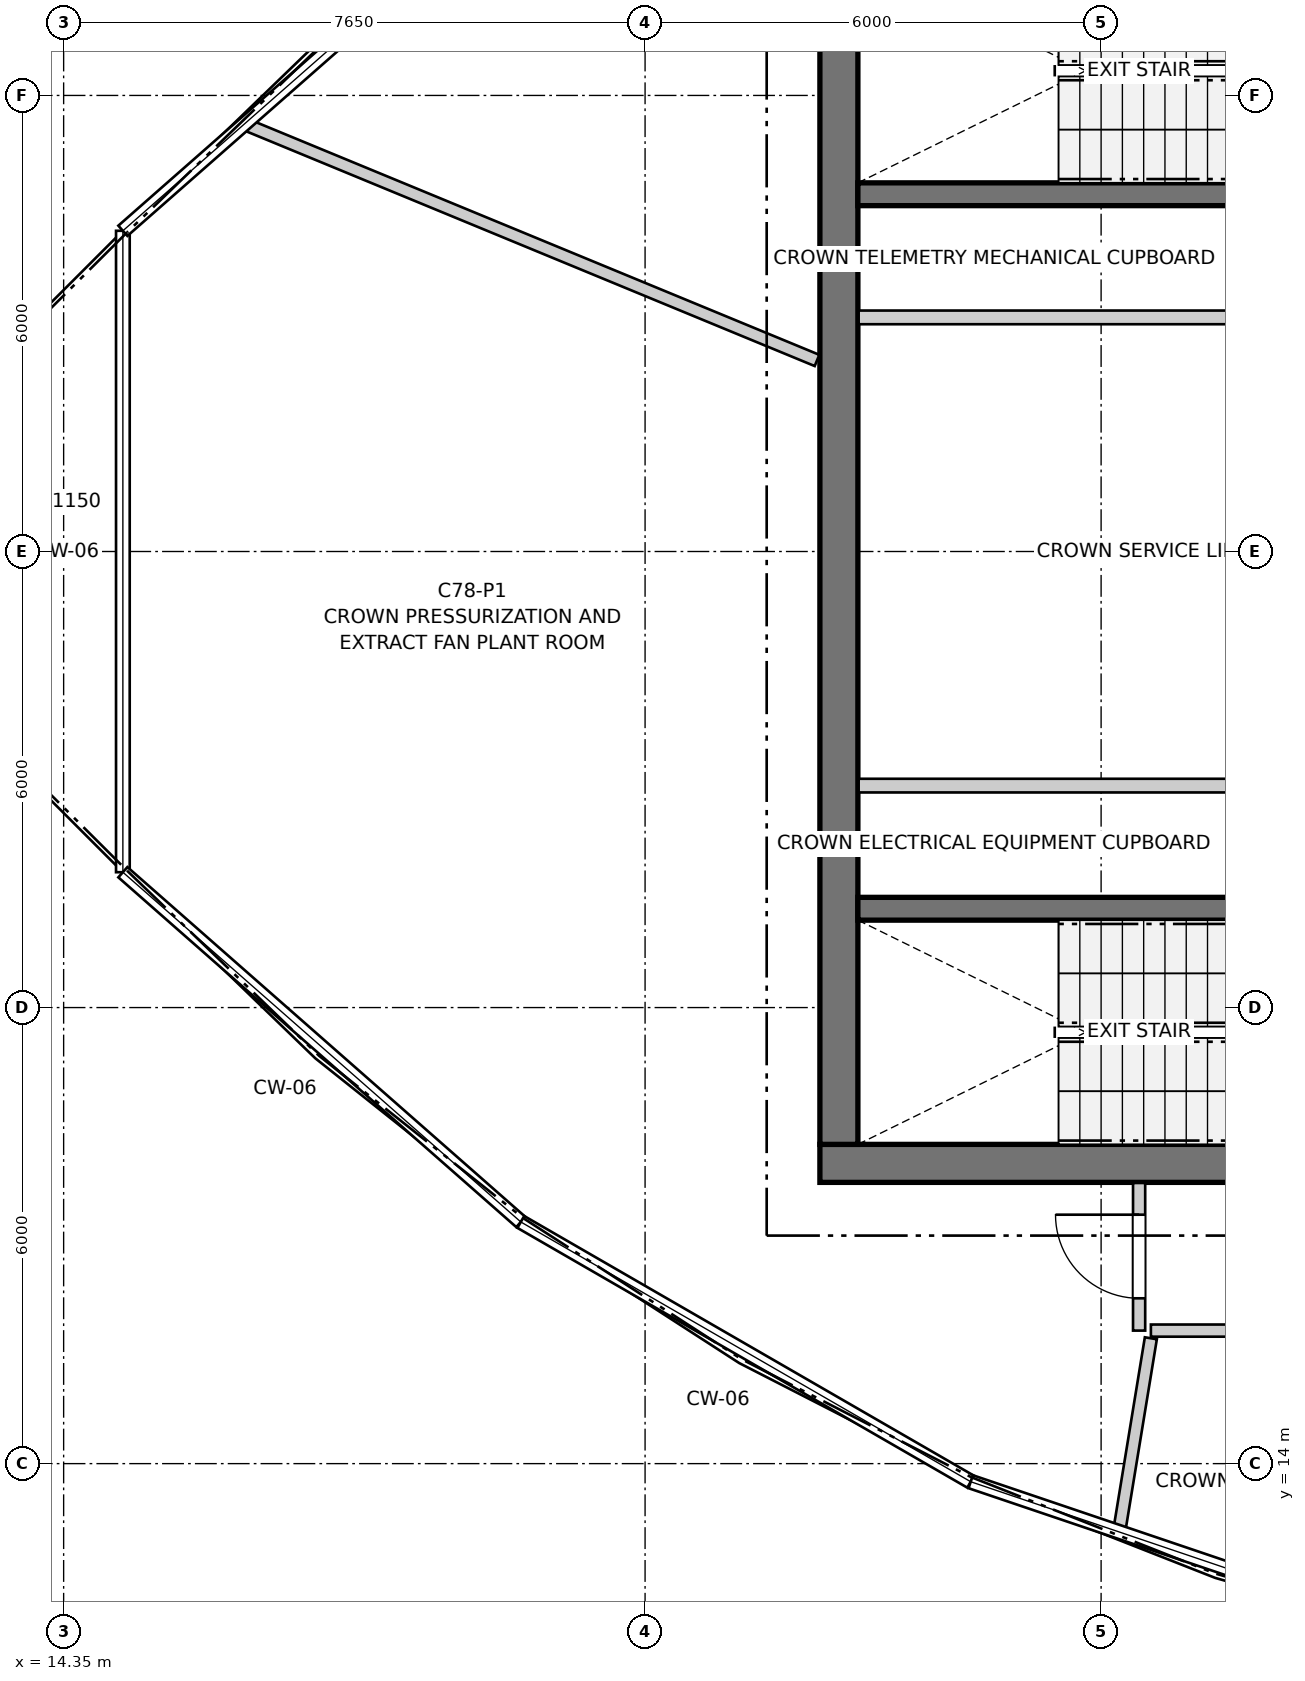
"""IFC4 building model, lengths in metres.
Left out: names, types, materials, properties, quantities, classifications, styles, units other than length and angle.
Written with IfcOpenShell. Run it as: python <this file> out.ifc"""

import sys

from ifc_helpers import new_model, si_unit, direction, frame, frame_2d, origin, place, context, subcontext, project, spatial, rectangle, extrude, source, transform, mapped, element, fill, save


model = new_model("IFC4")
c1 = context("Model", 3, precision=1e-05, world=origin(), true_north=direction((0.0, 1.0)))
c2 = subcontext(c1, "Body", "Model", "MODEL_VIEW")
j1 = project(units=[si_unit("LENGTHUNIT", "METRE"), si_unit("PLANEANGLEUNIT", "RADIAN")], contexts=[c1])
p1 = place(None, origin())
s1 = spatial("IfcSite", under=j1, at=p1, CompositionType="ELEMENT")
p2 = place(p1, origin())
s2 = spatial("IfcBuilding", under=s1, at=p2, CompositionType="ELEMENT")
p3 = place(p2, frame((0.0, 0.0, 261.8)))
s3 = spatial("IfcBuildingStorey", under=s2, at=p3, CompositionType="ELEMENT", Elevation=261.8)
p4 = place(p3, frame((24.3, 17.95, 0.0), z_axis=(0.0, 0.0, 1.0), x_axis=(1.0, 0.0, 0.0)))
e1 = element("IfcWall", 1, at=p4, inside=s3, PredefinedType="SHEAR", context=c2, shape_type="SweptSolid", body=[
    extrude(rectangle(XDim=12.1, YDim=0.5, at=frame_2d((6.05, 0.0))), origin(), (0.0, 0.0, 1.0), 4.05),
])
p5 = place(p3, frame((24.55, 33.8, 0.0), z_axis=(0.0, 0.0, 1.0), x_axis=(0.0, -1.0, 0.0)))
e2 = element("IfcWall", 2, at=p5, inside=s3, PredefinedType="SHEAR", context=c2, shape_type="SweptSolid", body=[
    extrude(rectangle(XDim=15.6, YDim=0.5, at=frame_2d((7.8, 0.0))), origin(), (0.0, 0.0, 1.0), 4.05),
])
p6 = place(p3, frame((24.8, 21.3, 0.0), z_axis=(0.0, 0.0, 1.0), x_axis=(1.0, 0.0, 0.0)))
e3 = element("IfcWall", 3, at=p6, inside=s3, PredefinedType="SHEAR", context=c2, shape_type="SweptSolid", body=[
    extrude(rectangle(XDim=11.1, YDim=0.3, at=frame_2d((5.55, 0.0))), origin(), (0.0, 0.0, 1.0), 4.05),
])
p7 = place(p6, frame((6.22, 0.0, 0.0)))
e4 = element("IfcOpeningElement", 4, at=p7, cuts=e3, PredefinedType="OPENING", context=c2, shape_type="SweptSolid", body=[
    extrude(rectangle(XDim=0.98, YDim=2.15, at=frame_2d((0.49, 1.075))), frame((0.0, 0.16, 0.0), z_axis=(0.0, -1.0, 0.0), x_axis=(1.0, 0.0, 0.0)), (0.0, 0.0, 1.0), 0.32),
])
p8 = place(p6, frame((9.15, 0.0, 0.0)))
e5 = element("IfcOpeningElement", 5, at=p8, cuts=e3, PredefinedType="OPENING", context=c2, shape_type="SweptSolid", body=[
    extrude(rectangle(XDim=1.15, YDim=2.15, at=frame_2d((0.575, 1.075))), frame((0.0, 0.16, 0.0), z_axis=(0.0, -1.0, 0.0), x_axis=(1.0, 0.0, 0.0)), (0.0, 0.0, 1.0), 0.32),
])
p9 = place(p3, frame((24.8, 30.7, 0.0), z_axis=(0.0, 0.0, 1.0), x_axis=(1.0, 0.0, 0.0)))
e6 = element("IfcWall", 6, at=p9, inside=s3, PredefinedType="SHEAR", context=c2, shape_type="SweptSolid", body=[
    extrude(rectangle(XDim=11.1, YDim=0.3, at=frame_2d((5.55, 0.0))), origin(), (0.0, 0.0, 1.0), 4.05),
])
p10 = place(p9, frame((6.22, 0.0, 0.0)))
e7 = element("IfcOpeningElement", 7, at=p10, cuts=e6, PredefinedType="OPENING", context=c2, shape_type="SweptSolid", body=[
    extrude(rectangle(XDim=0.98, YDim=2.15, at=frame_2d((0.49, 1.075))), frame((0.0, 0.16, 0.0), z_axis=(0.0, -1.0, 0.0), x_axis=(1.0, 0.0, 0.0)), (0.0, 0.0, 1.0), 0.32),
])
p11 = place(p9, frame((9.15, 0.0, 0.0)))
e8 = element("IfcOpeningElement", 8, at=p11, cuts=e6, PredefinedType="OPENING", context=c2, shape_type="SweptSolid", body=[
    extrude(rectangle(XDim=1.15, YDim=2.15, at=frame_2d((0.575, 1.075))), frame((0.0, 0.16, 0.0), z_axis=(0.0, -1.0, 0.0), x_axis=(1.0, 0.0, 0.0)), (0.0, 0.0, 1.0), 0.32),
])
for number, where, z_axis, x_axis in (
    (9, (24.81, 22.92, 0.0), (0.0, 0.0, 1.0), (1.0, 0.0, 0.0)),
    (10, (24.81, 29.08, 0.0), (0.0, 0.0, 1.0), (1.0, 0.0, 0.0)),
):
    element("IfcWall", number, at=place(p3, frame(where, z_axis=z_axis, x_axis=x_axis)), inside=s3, PredefinedType="PARTITIONING", context=c2, shape_type="SweptSolid", body=[
        extrude(rectangle(XDim=5.84, YDim=0.18, at=frame_2d((2.92, 0.0))), origin(), (0.0, 0.0, 1.0), 4.05),
    ])
p12 = place(p3, frame((28.5, 15.75, 0.0), z_axis=(0.0, 0.0, 1.0), x_axis=(0.0, 1.0, 0.0)))
e11 = element("IfcWall", 11, at=p12, inside=s3, PredefinedType="PARTITIONING", context=c2, shape_type="SweptSolid", body=[
    extrude(rectangle(XDim=1.942, YDim=0.16, at=frame_2d((0.971, 0.0))), origin(), (0.0, 0.0, 1.0), 4.05),
])
p13 = place(p12, frame((0.425, 0.0, 0.0)))
e12 = element("IfcOpeningElement", 12, at=p13, cuts=e11, PredefinedType="OPENING", context=c2, shape_type="SweptSolid", body=[
    extrude(rectangle(XDim=1.1, YDim=2.15, at=frame_2d((0.55, 1.075))), frame((0.0, 0.09, 0.0), z_axis=(0.0, -1.0, 0.0), x_axis=(1.0, 0.0, 0.0)), (0.0, 0.0, 1.0), 0.18),
])
p14 = place(p3, frame((28.655, 15.75, 0.0), z_axis=(0.0, 0.0, 1.0), x_axis=(1.0, 0.0, 0.0)))
e13 = element("IfcWall", 13, at=p14, inside=s3, PredefinedType="PARTITIONING", context=c2, shape_type="SweptSolid", body=[
    extrude(rectangle(XDim=9.907, YDim=0.16, at=frame_2d((4.954, 0.0))), origin(), (0.0, 0.0, 1.0), 4.05),
])
p15 = place(p3, frame((16.755, 31.614, 0.0), z_axis=(0.0, 0.0, 1.0), x_axis=(0.924294163269, -0.381680887323, 0.0)))
e14 = element("IfcWall", 14, at=p15, inside=s3, PredefinedType="PARTITIONING", context=c2, shape_type="SweptSolid", body=[
    extrude(rectangle(XDim=8.122, YDim=0.16, at=frame_2d((4.061, 0.0))), origin(), (0.0, 0.0, 1.0), 4.05),
])
p16 = place(p3, frame((28.241, 13.128, 0.0), z_axis=(0.0, 0.0, 1.0), x_axis=(0.161794860742, 0.986824413479, 0.0)))
e15 = element("IfcWall", 15, at=p16, inside=s3, PredefinedType="PARTITIONING", context=c2, shape_type="SweptSolid", body=[
    extrude(rectangle(XDim=2.555, YDim=0.16, at=frame_2d((1.277, 0.0))), origin(), (0.0, 0.0, 1.0), 4.05),
])
m1 = source(origin(), c2, "Body", "SweptSolid", [
    extrude(rectangle(XDim=1.1, YDim=2.15, at=frame_2d((0.55, 1.075))), frame((0.0, 0.025, 0.0), z_axis=(0.0, -1.0, 0.0), x_axis=(1.0, 0.0, 0.0)), (0.0, 0.0, 1.0), 0.05),
])
p17 = place(p13, origin())
e16 = element("IfcDoor", 16, at=p17, inside=s3, OperationType="SINGLE_SWING_RIGHT", PredefinedType="DOOR", context=c2, shape_type="MappedRepresentation", body=[
    mapped(m1, transform((0.0, 0.0, 0.0), x_axis=(1.0, 0.0, 0.0), y_axis=(0.0, 1.0, 0.0), z_axis=(0.0, 0.0, 1.0), scale=1.0)),
])
fill(e12, e16)
save(model, sys.argv[1])
